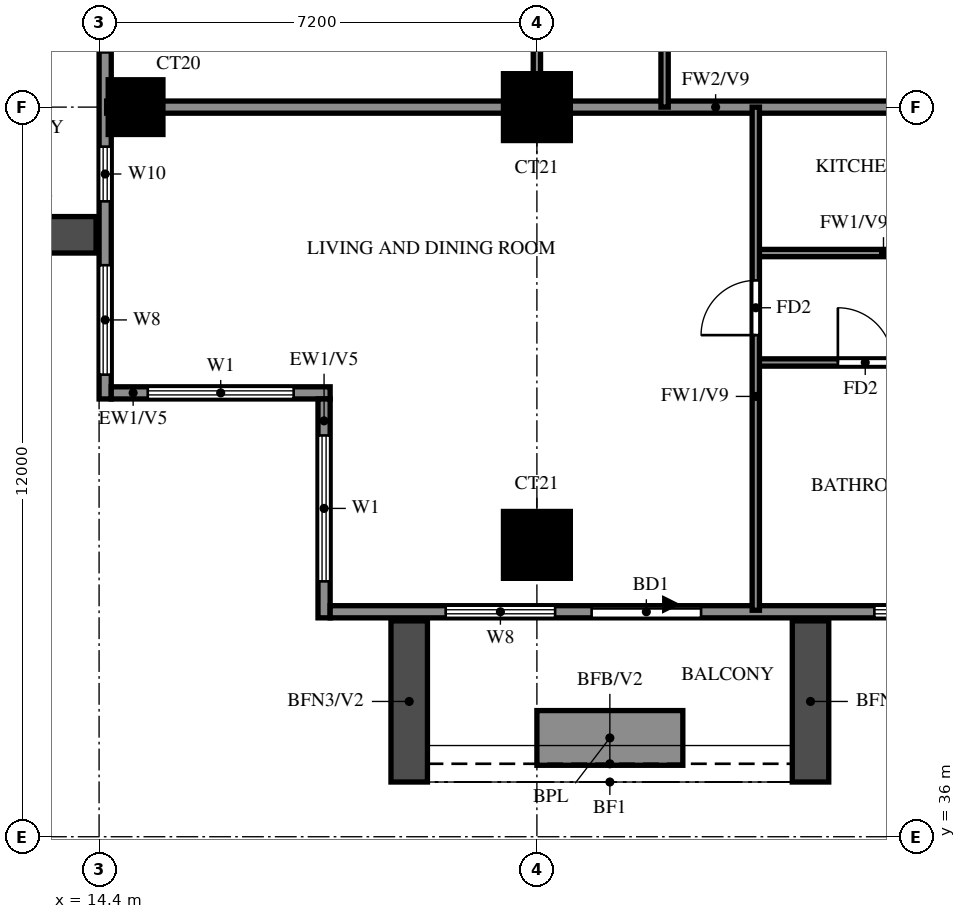
"""IFC4 building model, lengths in metres.
Left out: names, types, materials, properties, quantities, classifications, styles, units other than length and angle.
Written with IfcOpenShell. Run it as: python <this file> out.ifc"""

import sys

from ifc_helpers import new_model, si_unit, direction, frame, frame_2d, origin, origin_2d, place, context, subcontext, project, spatial, rectangle, extrude, source, transform, mapped, element, fill, save


model = new_model("IFC4")
c1 = context("Model", 3, precision=1e-05, world=origin(), true_north=direction((0.0, 1.0)))
c2 = subcontext(c1, "Body", "Model", "MODEL_VIEW")
j1 = project(units=[si_unit("LENGTHUNIT", "METRE"), si_unit("PLANEANGLEUNIT", "RADIAN")], contexts=[c1])
p1 = place(None, origin())
s1 = spatial("IfcSite", under=j1, at=p1, CompositionType="ELEMENT")
p2 = place(p1, origin())
s2 = spatial("IfcBuilding", under=s1, at=p2, CompositionType="ELEMENT")
p3 = place(p2, frame((0.0, 0.0, 134.0)))
s3 = spatial("IfcBuildingStorey", under=s2, at=p3, CompositionType="ELEMENT", Elevation=134.0)
m1 = source(origin(), c2, "Body", "SweptSolid", [
    extrude(rectangle(XDim=1.1, YDim=1.1, at=origin_2d()), origin(), (0.0, 0.0, 1.0), 3.15),
])
p4 = place(p3, frame((21.6, 40.8, 0.0), z_axis=(0.0, 0.0, 1.0), x_axis=(1.0, 0.0, 0.0)))
e1 = element("IfcColumn", 1, at=p4, inside=s3, PredefinedType="COLUMN", context=c2, shape_type="MappedRepresentation", body=[
    mapped(m1, transform((0.0, 0.0, 0.0))),
])
m2 = source(origin(), c2, "Body", "SweptSolid", [
    extrude(rectangle(XDim=0.9, YDim=0.9, at=origin_2d()), origin(), (0.0, 0.0, 1.0), 3.15),
])
p5 = place(p3, frame((15.0, 48.0, 0.0), z_axis=(0.0, 0.0, 1.0), x_axis=(1.0, 0.0, 0.0)))
e2 = element("IfcColumn", 2, at=p5, inside=s3, PredefinedType="COLUMN", context=c2, shape_type="MappedRepresentation", body=[
    mapped(m2, transform((0.0, 0.0, 0.0))),
])
p6 = place(p3, frame((21.6, 48.0, 0.0), z_axis=(0.0, 0.0, 1.0), x_axis=(1.0, 0.0, 0.0)))
e3 = element("IfcColumn", 3, at=p6, inside=s3, PredefinedType="COLUMN", context=c2, shape_type="MappedRepresentation", body=[
    mapped(m1, transform((0.0, 0.0, 0.0))),
])
p7 = place(p3, frame((14.5, 76.6, 0.0), z_axis=(0.0, 0.0, 1.0), x_axis=(0.0, -1.0, 0.0)))
e4 = element("IfcWall", 4, at=p7, inside=s3, PredefinedType="SOLIDWALL", context=c2, shape_type="SweptSolid", body=[
    extrude(rectangle(XDim=33.4, YDim=0.2, at=frame_2d((16.7, 0.0))), origin(), (0.0, 0.0, 1.0), 3.15),
])
p8 = place(p7, frame((11.5, 0.0, 0.0)))
e5 = element("IfcOpeningElement", 5, at=p8, cuts=e4, PredefinedType="OPENING", context=c2, shape_type="SweptSolid", body=[
    extrude(rectangle(XDim=1.8, YDim=2.4, at=frame_2d((0.9, 1.2))), frame((0.0, 0.11, 0.0), z_axis=(0.0, -1.0, 0.0), x_axis=(1.0, 0.0, 0.0)), (0.0, 0.0, 1.0), 0.22),
])
p9 = place(p7, frame((25.9, 0.0, 0.0)))
e6 = element("IfcOpeningElement", 6, at=p9, cuts=e4, PredefinedType="OPENING", context=c2, shape_type="SweptSolid", body=[
    extrude(rectangle(XDim=1.8, YDim=2.4, at=frame_2d((0.9, 1.2))), frame((0.0, 0.11, 0.0), z_axis=(0.0, -1.0, 0.0), x_axis=(1.0, 0.0, 0.0)), (0.0, 0.0, 1.0), 0.22),
])
p10 = place(p7, frame((29.25, 0.0, 0.6)))
e7 = element("IfcOpeningElement", 7, at=p10, cuts=e4, PredefinedType="OPENING", context=c2, shape_type="SweptSolid", body=[
    extrude(rectangle(XDim=0.9, YDim=2.4, at=frame_2d((0.45, 1.2))), frame((0.0, 0.11, 0.0), z_axis=(0.0, -1.0, 0.0), x_axis=(1.0, 0.0, 0.0)), (0.0, 0.0, 1.0), 0.22),
])
p11 = place(p7, frame((31.2, 0.0, 0.6)))
e8 = element("IfcOpeningElement", 8, at=p11, cuts=e4, PredefinedType="OPENING", context=c2, shape_type="SweptSolid", body=[
    extrude(rectangle(XDim=1.8, YDim=2.4, at=frame_2d((0.9, 1.2))), frame((0.0, 0.11, 0.0), z_axis=(0.0, -1.0, 0.0), x_axis=(1.0, 0.0, 0.0)), (0.0, 0.0, 1.0), 0.22),
])
p12 = place(p7, frame((18.2, 0.0, 0.6)))
e9 = element("IfcOpeningElement", 9, at=p12, cuts=e4, PredefinedType="OPENING", context=c2, shape_type="SweptSolid", body=[
    extrude(rectangle(XDim=2.4, YDim=2.4, at=frame_2d((1.2, 1.2))), frame((0.0, 0.11, 0.0), z_axis=(0.0, -1.0, 0.0), x_axis=(1.0, 0.0, 0.0)), (0.0, 0.0, 1.0), 0.22),
])
p13 = place(p7, frame((22.2, 0.0, 0.6)))
e10 = element("IfcOpeningElement", 10, at=p13, cuts=e4, PredefinedType="OPENING", context=c2, shape_type="SweptSolid", body=[
    extrude(rectangle(XDim=1.2, YDim=2.4, at=frame_2d((0.6, 1.2))), frame((0.0, 0.11, 0.0), z_axis=(0.0, -1.0, 0.0), x_axis=(1.0, 0.0, 0.0)), (0.0, 0.0, 1.0), 0.22),
])
p14 = place(p7, frame((14.85, 0.0, 0.6)))
e11 = element("IfcOpeningElement", 11, at=p14, cuts=e4, PredefinedType="OPENING", context=c2, shape_type="SweptSolid", body=[
    extrude(rectangle(XDim=0.9, YDim=2.4, at=frame_2d((0.45, 1.2))), frame((0.0, 0.11, 0.0), z_axis=(0.0, -1.0, 0.0), x_axis=(1.0, 0.0, 0.0)), (0.0, 0.0, 1.0), 0.22),
])
p15 = place(p7, frame((16.75, 0.0, 0.6)))
e12 = element("IfcOpeningElement", 12, at=p15, cuts=e4, PredefinedType="OPENING", context=c2, shape_type="SweptSolid", body=[
    extrude(rectangle(XDim=0.9, YDim=2.4, at=frame_2d((0.45, 1.2))), frame((0.0, 0.11, 0.0), z_axis=(0.0, -1.0, 0.0), x_axis=(1.0, 0.0, 0.0)), (0.0, 0.0, 1.0), 0.22),
])
p16 = place(p7, frame((7.8, 0.0, 0.6)))
e13 = element("IfcOpeningElement", 13, at=p16, cuts=e4, PredefinedType="OPENING", context=c2, shape_type="SweptSolid", body=[
    extrude(rectangle(XDim=1.2, YDim=2.4, at=frame_2d((0.6, 1.2))), frame((0.0, 0.11, 0.0), z_axis=(0.0, -1.0, 0.0), x_axis=(1.0, 0.0, 0.0)), (0.0, 0.0, 1.0), 0.22),
])
p17 = place(p7, frame((10.15, 0.0, 0.6)))
e14 = element("IfcOpeningElement", 14, at=p17, cuts=e4, PredefinedType="OPENING", context=c2, shape_type="SweptSolid", body=[
    extrude(rectangle(XDim=0.9, YDim=2.4, at=frame_2d((0.45, 1.2))), frame((0.0, 0.11, 0.0), z_axis=(0.0, -1.0, 0.0), x_axis=(1.0, 0.0, 0.0)), (0.0, 0.0, 1.0), 0.22),
])
p18 = place(p7, frame((4.55, 0.0, 1.5)))
e15 = element("IfcOpeningElement", 15, at=p18, cuts=e4, PredefinedType="OPENING", context=c2, shape_type="SweptSolid", body=[
    extrude(rectangle(XDim=0.9, YDim=0.9, at=frame_2d((0.45, 0.45))), frame((0.0, 0.11, 0.0), z_axis=(0.0, -1.0, 0.0), x_axis=(1.0, 0.0, 0.0)), (0.0, 0.0, 1.0), 0.22),
])
p19 = place(p7, frame((0.6, 0.0, 0.6)))
e16 = element("IfcOpeningElement", 16, at=p19, cuts=e4, PredefinedType="OPENING", context=c2, shape_type="SweptSolid", body=[
    extrude(rectangle(XDim=2.4, YDim=2.4, at=frame_2d((1.2, 1.2))), frame((0.0, 0.11, 0.0), z_axis=(0.0, -1.0, 0.0), x_axis=(1.0, 0.0, 0.0)), (0.0, 0.0, 1.0), 0.22),
])
p20 = place(p3, frame((14.6, 43.3, 0.0), z_axis=(0.0, 0.0, 1.0), x_axis=(1.0, 0.0, 0.0)))
e17 = element("IfcWall", 17, at=p20, inside=s3, PredefinedType="SOLIDWALL", context=c2, shape_type="SweptSolid", body=[
    extrude(rectangle(XDim=3.6, YDim=0.2, at=frame_2d((1.8, 0.0))), origin(), (0.0, 0.0, 1.0), 3.15),
])
p21 = place(p20, frame((0.6, 0.0, 0.6)))
e18 = element("IfcOpeningElement", 18, at=p21, cuts=e17, PredefinedType="OPENING", context=c2, shape_type="SweptSolid", body=[
    extrude(rectangle(XDim=2.4, YDim=2.4, at=frame_2d((1.2, 1.2))), frame((0.0, 0.11, 0.0), z_axis=(0.0, -1.0, 0.0), x_axis=(1.0, 0.0, 0.0)), (0.0, 0.0, 1.0), 0.22),
])
p22 = place(p3, frame((18.1, 43.2, 0.0), z_axis=(0.0, 0.0, 1.0), x_axis=(0.0, -1.0, 0.0)))
e19 = element("IfcWall", 19, at=p22, inside=s3, PredefinedType="SOLIDWALL", context=c2, shape_type="SweptSolid", body=[
    extrude(rectangle(XDim=3.6, YDim=0.2, at=frame_2d((1.8, 0.0))), origin(), (0.0, 0.0, 1.0), 3.15),
])
p23 = place(p22, frame((0.6, 0.0, 0.6)))
e20 = element("IfcOpeningElement", 20, at=p23, cuts=e19, PredefinedType="OPENING", context=c2, shape_type="SweptSolid", body=[
    extrude(rectangle(XDim=2.4, YDim=2.4, at=frame_2d((1.2, 1.2))), frame((0.0, 0.11, 0.0), z_axis=(0.0, -1.0, 0.0), x_axis=(1.0, 0.0, 0.0)), (0.0, 0.0, 1.0), 0.22),
])
p24 = place(p3, frame((18.2, 39.7, 0.0), z_axis=(0.0, 0.0, 1.0), x_axis=(1.0, 0.0, 0.0)))
e21 = element("IfcWall", 21, at=p24, inside=s3, PredefinedType="SOLIDWALL", context=c2, shape_type="SweptSolid", body=[
    extrude(rectangle(XDim=23.8, YDim=0.2, at=frame_2d((11.9, 0.0))), origin(), (0.0, 0.0, 1.0), 3.15),
])
p25 = place(p24, frame((4.3, 0.0, 0.0)))
e22 = element("IfcOpeningElement", 22, at=p25, cuts=e21, PredefinedType="OPENING", context=c2, shape_type="SweptSolid", body=[
    extrude(rectangle(XDim=1.8, YDim=2.4, at=frame_2d((0.9, 1.2))), frame((0.0, 0.11, 0.0), z_axis=(0.0, -1.0, 0.0), x_axis=(1.0, 0.0, 0.0)), (0.0, 0.0, 1.0), 0.22),
])
p26 = place(p24, frame((1.9, 0.0, 0.6)))
e23 = element("IfcOpeningElement", 23, at=p26, cuts=e21, PredefinedType="OPENING", context=c2, shape_type="SweptSolid", body=[
    extrude(rectangle(XDim=1.8, YDim=2.4, at=frame_2d((0.9, 1.2))), frame((0.0, 0.11, 0.0), z_axis=(0.0, -1.0, 0.0), x_axis=(1.0, 0.0, 0.0)), (0.0, 0.0, 1.0), 0.22),
])
p27 = place(p24, frame((8.95, 0.0, 1.5)))
e24 = element("IfcOpeningElement", 24, at=p27, cuts=e21, PredefinedType="OPENING", context=c2, shape_type="SweptSolid", body=[
    extrude(rectangle(XDim=0.9, YDim=0.9, at=frame_2d((0.45, 0.45))), frame((0.0, 0.11, 0.0), z_axis=(0.0, -1.0, 0.0), x_axis=(1.0, 0.0, 0.0)), (0.0, 0.0, 1.0), 0.22),
])
p28 = place(p24, frame((11.8, 0.0, 0.6)))
e25 = element("IfcOpeningElement", 25, at=p28, cuts=e21, PredefinedType="OPENING", context=c2, shape_type="SweptSolid", body=[
    extrude(rectangle(XDim=2.4, YDim=2.4, at=frame_2d((1.2, 1.2))), frame((0.0, 0.11, 0.0), z_axis=(0.0, -1.0, 0.0), x_axis=(1.0, 0.0, 0.0)), (0.0, 0.0, 1.0), 0.22),
])
for number, where, z_axis, x_axis in (
    (26, (14.35, 45.9, 0.0), (0.0, 0.0, 1.0), (-1.0, 0.0, 0.0)),
    (27, (19.5, 39.55, 0.0), (0.0, 0.0, 1.0), (0.0, -1.0, 0.0)),
    (28, (26.1, 39.55, 0.0), (0.0, 0.0, 1.0), (0.0, -1.0, 0.0)),
):
    element("IfcWall", number, at=place(p3, frame(where, z_axis=z_axis, x_axis=x_axis)), inside=s3, PredefinedType="SOLIDWALL", context=c2, shape_type="SweptSolid", body=[
        extrude(rectangle(XDim=2.65, YDim=0.6, at=frame_2d((1.325, 0.0))), origin(), (0.0, 0.0, 1.0), 2.8),
    ])
p29 = place(p3, frame((21.6, 37.625, 0.0), z_axis=(0.0, 0.0, 1.0), x_axis=(1.0, 0.0, 0.0)))
e29 = element("IfcWall", 29, at=p29, inside=s3, PredefinedType="SOLIDWALL", context=c2, shape_type="SweptSolid", body=[
    extrude(rectangle(XDim=2.4, YDim=0.9, at=frame_2d((1.2, 0.0))), origin(), (0.0, 0.0, 1.0), 0.9),
])
p30 = place(p3, frame((14.525, 48.0, 0.0), z_axis=(0.0, 0.0, 1.0), x_axis=(1.0, 0.0, 0.0)))
e30 = element("IfcWall", 30, at=p30, inside=s3, PredefinedType="SOLIDWALL", context=c2, shape_type="SweptSolid", body=[
    extrude(rectangle(XDim=19.075, YDim=0.2, at=frame_2d((9.538, 0.0))), origin(), (0.0, 0.0, 1.0), 3.15),
])
p31 = place(p3, frame((25.2, 43.8, 0.0), z_axis=(0.0, 0.0, 1.0), x_axis=(1.0, 0.0, 0.0)))
e31 = element("IfcWall", 31, at=p31, inside=s3, PredefinedType="PARTITIONING", context=c2, shape_type="SweptSolid", body=[
    extrude(rectangle(XDim=8.4, YDim=0.12, at=frame_2d((4.2, 0.0))), origin(), (0.0, 0.0, 1.0), 3.15),
])
p32 = place(p31, frame((1.35, 0.0, 0.0)))
e32 = element("IfcOpeningElement", 32, at=p32, cuts=e31, PredefinedType="OPENING", context=c2, shape_type="SweptSolid", body=[
    extrude(rectangle(XDim=0.9, YDim=2.1, at=frame_2d((0.45, 1.05))), frame((0.0, 0.07, 0.0), z_axis=(0.0, -1.0, 0.0), x_axis=(1.0, 0.0, 0.0)), (0.0, 0.0, 1.0), 0.14),
])
p33 = place(p31, frame((5.55, 0.0, 0.0)))
e33 = element("IfcOpeningElement", 33, at=p33, cuts=e31, PredefinedType="OPENING", context=c2, shape_type="SweptSolid", body=[
    extrude(rectangle(XDim=0.9, YDim=2.1, at=frame_2d((0.45, 1.05))), frame((0.0, 0.07, 0.0), z_axis=(0.0, -1.0, 0.0), x_axis=(1.0, 0.0, 0.0)), (0.0, 0.0, 1.0), 0.14),
])
p34 = place(p3, frame((25.2, 45.6, 0.0), z_axis=(0.0, 0.0, 1.0), x_axis=(1.0, 0.0, 0.0)))
e34 = element("IfcWall", 34, at=p34, inside=s3, PredefinedType="PARTITIONING", context=c2, shape_type="SweptSolid", body=[
    extrude(rectangle(XDim=6.0, YDim=0.12, at=frame_2d((3.0, 0.0))), origin(), (0.0, 0.0, 1.0), 3.15),
])
p35 = place(p34, frame((2.55, 0.0, 0.0)))
e35 = element("IfcOpeningElement", 35, at=p35, cuts=e34, PredefinedType="OPENING", context=c2, shape_type="SweptSolid", body=[
    extrude(rectangle(XDim=0.9, YDim=2.1, at=frame_2d((0.45, 1.05))), frame((0.0, 0.07, 0.0), z_axis=(0.0, -1.0, 0.0), x_axis=(1.0, 0.0, 0.0)), (0.0, 0.0, 1.0), 0.14),
])
p36 = place(p3, frame((21.6, 48.0, 0.0), z_axis=(0.0, 0.0, 1.0), x_axis=(0.0, 1.0, 0.0)))
e36 = element("IfcWall", 36, at=p36, inside=s3, PredefinedType="PARTITIONING", context=c2, shape_type="SweptSolid", body=[
    extrude(rectangle(XDim=21.6, YDim=0.12, at=frame_2d((10.8, 0.0))), origin(), (0.0, 0.0, 1.0), 3.15),
])
p37 = place(p36, frame((1.35, 0.0, 0.0)))
e37 = element("IfcOpeningElement", 37, at=p37, cuts=e36, PredefinedType="OPENING", context=c2, shape_type="SweptSolid", body=[
    extrude(rectangle(XDim=0.9, YDim=2.1, at=frame_2d((0.45, 1.05))), frame((0.0, 0.07, 0.0), z_axis=(0.0, -1.0, 0.0), x_axis=(1.0, 0.0, 0.0)), (0.0, 0.0, 1.0), 0.14),
])
p38 = place(p36, frame((7.95, 0.0, 0.0)))
e38 = element("IfcOpeningElement", 38, at=p38, cuts=e36, PredefinedType="OPENING", context=c2, shape_type="SweptSolid", body=[
    extrude(rectangle(XDim=1.5, YDim=2.1, at=frame_2d((0.75, 1.05))), frame((0.0, 0.07, 0.0), z_axis=(0.0, -1.0, 0.0), x_axis=(1.0, 0.0, 0.0)), (0.0, 0.0, 1.0), 0.14),
])
p39 = place(p36, frame((12.15, 0.0, 0.0)))
e39 = element("IfcOpeningElement", 39, at=p39, cuts=e36, PredefinedType="OPENING", context=c2, shape_type="SweptSolid", body=[
    extrude(rectangle(XDim=0.9, YDim=2.1, at=frame_2d((0.45, 1.05))), frame((0.0, 0.07, 0.0), z_axis=(0.0, -1.0, 0.0), x_axis=(1.0, 0.0, 0.0)), (0.0, 0.0, 1.0), 0.14),
])
p40 = place(p36, frame((17.55, 0.0, 0.0)))
e40 = element("IfcOpeningElement", 40, at=p40, cuts=e36, PredefinedType="OPENING", context=c2, shape_type="SweptSolid", body=[
    extrude(rectangle(XDim=0.9, YDim=2.1, at=frame_2d((0.45, 1.05))), frame((0.0, 0.07, 0.0), z_axis=(0.0, -1.0, 0.0), x_axis=(1.0, 0.0, 0.0)), (0.0, 0.0, 1.0), 0.14),
])
p41 = place(p3, frame((23.7, 48.0, 0.0), z_axis=(0.0, 0.0, 1.0), x_axis=(0.0, 1.0, 0.0)))
e41 = element("IfcWall", 41, at=p41, inside=s3, PredefinedType="PARTITIONING", context=c2, shape_type="SweptSolid", body=[
    extrude(rectangle(XDim=3.6, YDim=0.12, at=frame_2d((1.8, 0.0))), origin(), (0.0, 0.0, 1.0), 3.15),
])
p42 = place(p3, frame((25.2, 39.725, 0.0), z_axis=(0.0, 0.0, 1.0), x_axis=(0.0, 1.0, 0.0)))
e42 = element("IfcWall", 42, at=p42, inside=s3, PredefinedType="PARTITIONING", context=c2, shape_type="SweptSolid", body=[
    extrude(rectangle(XDim=8.275, YDim=0.12, at=frame_2d((4.137, 0.0))), origin(), (0.0, 0.0, 1.0), 3.15),
])
p43 = place(p42, frame((4.525, 0.0, 0.0)))
e43 = element("IfcOpeningElement", 43, at=p43, cuts=e42, PredefinedType="OPENING", context=c2, shape_type="SweptSolid", body=[
    extrude(rectangle(XDim=0.9, YDim=2.1, at=frame_2d((0.45, 1.05))), frame((0.0, 0.07, 0.0), z_axis=(0.0, -1.0, 0.0), x_axis=(1.0, 0.0, 0.0)), (0.0, 0.0, 1.0), 0.14),
])
p44 = place(p10, origin())
e44 = element("IfcWindow", 44, at=p44, inside=s3, PartitioningType="SINGLE_PANEL", PredefinedType="WINDOW", context=c2, shape_type="SweptSolid", body=[
    extrude(rectangle(XDim=0.9, YDim=2.4, at=frame_2d((0.45, 1.2))), frame((0.0, 0.03, 0.0), z_axis=(0.0, -1.0, 0.0), x_axis=(1.0, 0.0, 0.0)), (0.0, 0.0, 1.0), 0.06),
])
fill(e7, e44)
p45 = place(p11, origin())
e45 = element("IfcWindow", 45, at=p45, inside=s3, PartitioningType="DOUBLE_PANEL_VERTICAL", PredefinedType="WINDOW", context=c2, shape_type="SweptSolid", body=[
    extrude(rectangle(XDim=1.8, YDim=2.4, at=frame_2d((0.9, 1.2))), frame((0.0, 0.03, 0.0), z_axis=(0.0, -1.0, 0.0), x_axis=(1.0, 0.0, 0.0)), (0.0, 0.0, 1.0), 0.06),
])
fill(e8, e45)
p46 = place(p21, origin())
e46 = element("IfcWindow", 46, at=p46, inside=s3, PartitioningType="DOUBLE_PANEL_VERTICAL", PredefinedType="WINDOW", context=c2, shape_type="SweptSolid", body=[
    extrude(rectangle(XDim=2.4, YDim=2.4, at=frame_2d((1.2, 1.2))), frame((0.0, 0.03, 0.0), z_axis=(0.0, -1.0, 0.0), x_axis=(1.0, 0.0, 0.0)), (0.0, 0.0, 1.0), 0.06),
])
fill(e18, e46)
p47 = place(p23, origin())
e47 = element("IfcWindow", 47, at=p47, inside=s3, PartitioningType="DOUBLE_PANEL_VERTICAL", PredefinedType="WINDOW", context=c2, shape_type="SweptSolid", body=[
    extrude(rectangle(XDim=2.4, YDim=2.4, at=frame_2d((1.2, 1.2))), frame((0.0, 0.03, 0.0), z_axis=(0.0, -1.0, 0.0), x_axis=(1.0, 0.0, 0.0)), (0.0, 0.0, 1.0), 0.06),
])
fill(e20, e47)
p48 = place(p25, origin())
e48 = element("IfcDoor", 48, at=p48, inside=s3, OperationType="DOUBLE_DOOR_SLIDING", PredefinedType="DOOR", context=c2, shape_type="SweptSolid", body=[
    extrude(rectangle(XDim=1.8, YDim=2.4, at=frame_2d((0.9, 1.2))), frame((0.0, 0.025, 0.0), z_axis=(0.0, -1.0, 0.0), x_axis=(1.0, 0.0, 0.0)), (0.0, 0.0, 1.0), 0.05),
])
fill(e22, e48)
p49 = place(p26, origin())
e49 = element("IfcWindow", 49, at=p49, inside=s3, PartitioningType="DOUBLE_PANEL_VERTICAL", PredefinedType="WINDOW", context=c2, shape_type="SweptSolid", body=[
    extrude(rectangle(XDim=1.8, YDim=2.4, at=frame_2d((0.9, 1.2))), frame((0.0, 0.03, 0.0), z_axis=(0.0, -1.0, 0.0), x_axis=(1.0, 0.0, 0.0)), (0.0, 0.0, 1.0), 0.06),
])
fill(e23, e49)
p50 = place(p27, origin())
e50 = element("IfcWindow", 50, at=p50, inside=s3, PartitioningType="SINGLE_PANEL", PredefinedType="WINDOW", context=c2, shape_type="SweptSolid", body=[
    extrude(rectangle(XDim=0.9, YDim=0.9, at=frame_2d((0.45, 0.45))), frame((0.0, 0.03, 0.0), z_axis=(0.0, -1.0, 0.0), x_axis=(1.0, 0.0, 0.0)), (0.0, 0.0, 1.0), 0.06),
])
fill(e24, e50)
p51 = place(p43, origin())
e51 = element("IfcDoor", 51, at=p51, inside=s3, OperationType="SINGLE_SWING_RIGHT", PredefinedType="DOOR", context=c2, shape_type="SweptSolid", body=[
    extrude(rectangle(XDim=0.9, YDim=2.1, at=frame_2d((0.45, 1.05))), frame((0.0, 0.025, 0.0), z_axis=(0.0, -1.0, 0.0), x_axis=(1.0, 0.0, 0.0)), (0.0, 0.0, 1.0), 0.05),
])
fill(e43, e51)
p52 = place(p32, origin())
e52 = element("IfcDoor", 52, at=p52, inside=s3, OperationType="SINGLE_SWING_LEFT", PredefinedType="DOOR", context=c2, shape_type="SweptSolid", body=[
    extrude(rectangle(XDim=0.9, YDim=2.1, at=frame_2d((0.45, 1.05))), frame((0.0, 0.025, 0.0), z_axis=(0.0, -1.0, 0.0), x_axis=(1.0, 0.0, 0.0)), (0.0, 0.0, 1.0), 0.05),
])
fill(e32, e52)
save(model, sys.argv[1])
